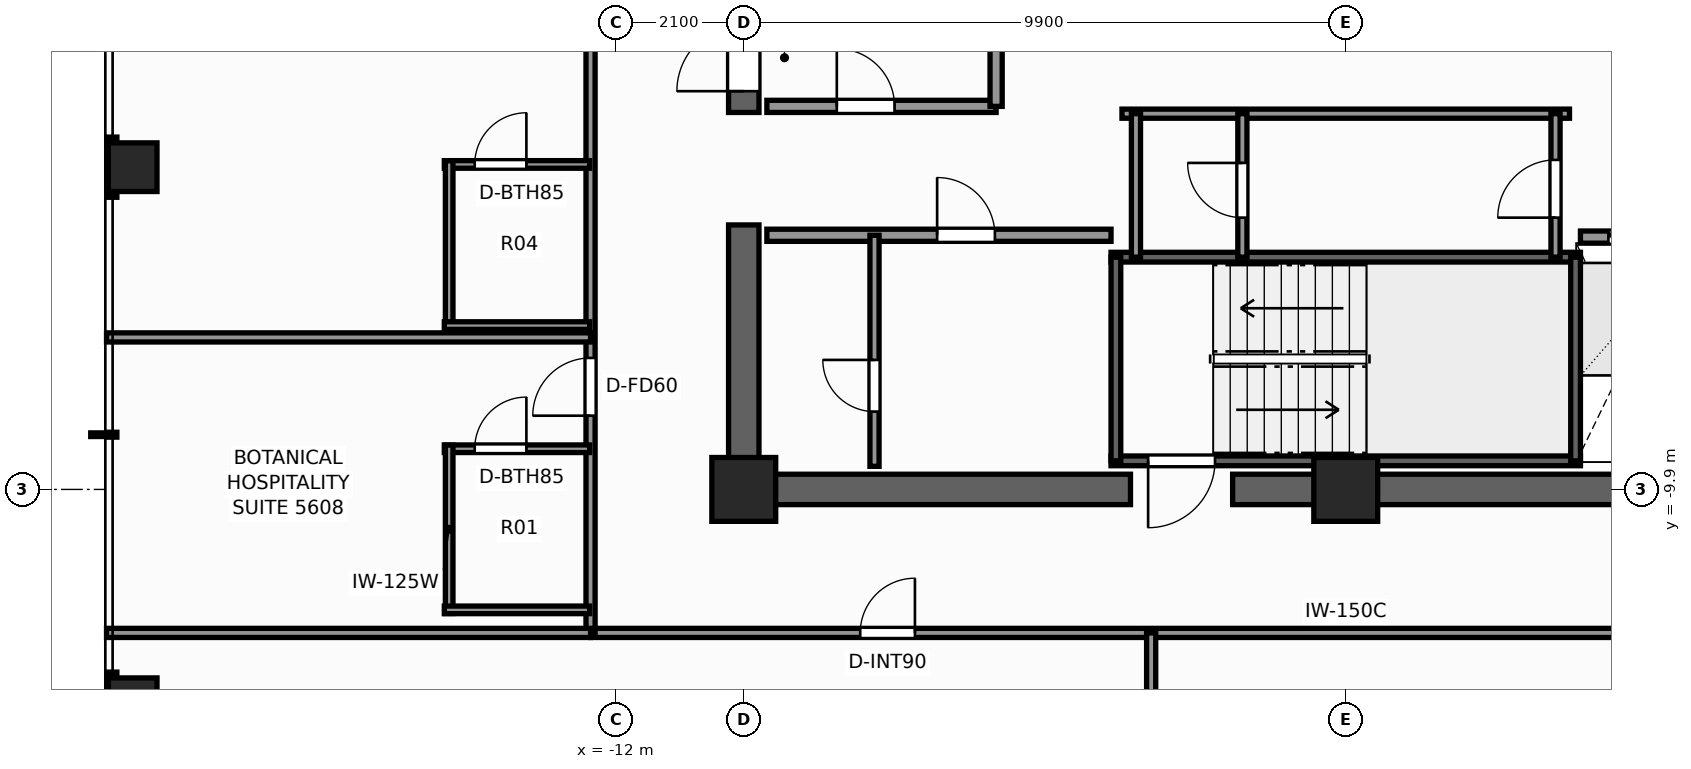
"""IFC4 building model, lengths in metres.
Left out: names, types, materials, properties, quantities, classifications, styles, units other than length and angle.
Written with IfcOpenShell. Run it as: python <this file> out.ifc"""

import sys

from ifc_helpers import new_model, si_unit, direction, frame, frame_2d, origin, origin_2d, place, context, subcontext, project, spatial, rectangle, extrude, element, fill, save


model = new_model("IFC4")
c1 = context("Model", 3, precision=1e-05, world=origin(), true_north=direction((0.0, 1.0)))
c2 = subcontext(c1, "Body", "Model", "MODEL_VIEW")
j1 = project(units=[si_unit("LENGTHUNIT", "METRE"), si_unit("PLANEANGLEUNIT", "RADIAN")], contexts=[c1])
p1 = place(None, origin())
s1 = spatial("IfcSite", under=j1, at=p1, CompositionType="ELEMENT")
p2 = place(p1, origin())
s2 = spatial("IfcBuilding", under=s1, at=p2, CompositionType="ELEMENT")
p3 = place(p2, frame((0.0, 0.0, 193.2)))
s3 = spatial("IfcBuildingStorey", under=s2, at=p3, CompositionType="ELEMENT", Elevation=193.2)
p4 = place(p3, frame((10.15, -9.9, 0.0), z_axis=(0.0, 0.0, 1.0), x_axis=(-1.0, 0.0, 0.0)))
e1 = element("IfcWall", 1, at=p4, inside=s3, PredefinedType="SHEAR", context=c2, shape_type="SweptSolid", body=[
    extrude(rectangle(XDim=12.01, YDim=0.5, at=frame_2d((6.005, 0.0))), origin(), (0.0, 0.0, 1.0), 3.3),
])
p5 = place(p3, frame((-3.54, -9.9, 0.0), z_axis=(0.0, 0.0, 1.0), x_axis=(-1.0, 0.0, 0.0)))
e2 = element("IfcWall", 2, at=p5, inside=s3, PredefinedType="SHEAR", context=c2, shape_type="SweptSolid", body=[
    extrude(rectangle(XDim=6.61, YDim=0.5, at=frame_2d((3.305, 0.0))), origin(), (0.0, 0.0, 1.0), 3.3),
])
p6 = place(p3, frame((-9.9, -9.65, 0.0), z_axis=(0.0, 0.0, 1.0), x_axis=(0.0, 1.0, 0.0)))
e3 = element("IfcWall", 3, at=p6, inside=s3, PredefinedType="SHEAR", context=c2, shape_type="SweptSolid", body=[
    extrude(rectangle(XDim=4.1, YDim=0.5, at=frame_2d((2.05, 0.0))), origin(), (0.0, 0.0, 1.0), 3.3),
])
p7 = place(p3, frame((-9.9, -3.7, 0.0), z_axis=(0.0, 0.0, 1.0), x_axis=(0.0, 1.0, 0.0)))
e4 = element("IfcWall", 4, at=p7, inside=s3, PredefinedType="SHEAR", context=c2, shape_type="SweptSolid", body=[
    extrude(rectangle(XDim=13.35, YDim=0.5, at=frame_2d((6.675, 0.0))), origin(), (0.0, 0.0, 1.0), 3.3),
])
p8 = place(p7, frame((0.35, 0.0, 0.0)))
e5 = element("IfcOpeningElement", 5, at=p8, cuts=e4, PredefinedType="OPENING", context=c2, shape_type="SweptSolid", body=[
    extrude(rectangle(XDim=1.1, YDim=2.2, at=frame_2d((0.55, 1.1))), frame((0.0, 0.26, 0.0), z_axis=(0.0, -1.0, 0.0), x_axis=(1.0, 0.0, 0.0)), (0.0, 0.0, 1.0), 0.52),
])
for number, where, z_axis, x_axis in (
    (6, (-9.9, -9.9, 0.0), (0.0, 0.0, 1.0), (1.0, 0.0, 0.0)),
    (7, (0.0, -9.9, 0.0), (0.0, 0.0, 1.0), (1.0, 0.0, 0.0)),
):
    element("IfcColumn", number, at=place(p3, frame(where, z_axis=z_axis, x_axis=x_axis)), inside=s3, PredefinedType="COLUMN", context=c2, shape_type="SweptSolid", body=[
        extrude(rectangle(XDim=1.05, YDim=1.05, at=origin_2d()), origin(), (0.0, 0.0, 1.0), 3.3),
    ])
for number, where, z_axis, x_axis in (
    (8, (-19.95, -13.4, 0.0), (0.0, 0.0, 1.0), (1.0, 0.0, 0.0)),
    (9, (-19.95, -4.6, 0.0), (0.0, 0.0, 1.0), (1.0, 0.0, 0.0)),
):
    element("IfcColumn", number, at=place(p3, frame(where, z_axis=z_axis, x_axis=x_axis)), inside=s3, PredefinedType="COLUMN", context=c2, shape_type="SweptSolid", body=[
        extrude(rectangle(XDim=0.8, YDim=0.8, at=origin_2d()), origin(), (0.0, 0.0, 1.0), 3.3),
    ])
p9 = place(p3, frame((3.86, -9.43, 0.0), z_axis=(0.0, 0.0, 1.0), x_axis=(-1.0, 0.0, 0.0)))
e10 = element("IfcWall", 10, at=p9, inside=s3, PredefinedType="SHEAR", context=c2, shape_type="SweptSolid", body=[
    extrude(rectangle(XDim=7.72, YDim=0.16, at=frame_2d((3.86, 0.0))), origin(), (0.0, 0.0, 1.0), 3.3),
])
p10 = place(p9, frame((6.01, 0.0, 0.0)))
e11 = element("IfcOpeningElement", 11, at=p10, cuts=e10, PredefinedType="OPENING", context=c2, shape_type="SweptSolid", body=[
    extrude(rectangle(XDim=1.1, YDim=2.2, at=frame_2d((0.55, 1.1))), frame((0.0, 0.09, 0.0), z_axis=(0.0, -1.0, 0.0), x_axis=(1.0, 0.0, 0.0)), (0.0, 0.0, 1.0), 0.18),
])
p11 = place(p3, frame((-3.86, -6.08, 0.0), z_axis=(0.0, 0.0, 1.0), x_axis=(1.0, 0.0, 0.0)))
e12 = element("IfcWall", 12, at=p11, inside=s3, PredefinedType="SHEAR", context=c2, shape_type="SweptSolid", body=[
    extrude(rectangle(XDim=7.72, YDim=0.16, at=frame_2d((3.86, 0.0))), origin(), (0.0, 0.0, 1.0), 3.3),
])
for number, where, z_axis, x_axis in (
    (13, (-3.78, -9.43, 0.0), (0.0, 0.0, 1.0), (0.0, 1.0, 0.0)),
    (14, (3.78, -9.43, 0.0), (0.0, 0.0, 1.0), (0.0, 1.0, 0.0)),
):
    element("IfcWall", number, at=place(p3, frame(where, z_axis=z_axis, x_axis=x_axis)), inside=s3, PredefinedType="SHEAR", context=c2, shape_type="SweptSolid", body=[
        extrude(rectangle(XDim=3.35, YDim=0.16, at=frame_2d((1.675, 0.0))), origin(), (0.0, 0.0, 1.0), 3.3),
    ])
p12 = place(p3, frame((-9.52, -3.6, 0.0), z_axis=(0.0, 0.0, 1.0), x_axis=(1.0, 0.0, 0.0)))
e15 = element("IfcWall", 15, at=p12, inside=s3, PredefinedType="SOLIDWALL", context=c2, shape_type="SweptSolid", body=[
    extrude(rectangle(XDim=3.77, YDim=0.2, at=frame_2d((1.885, 0.0))), origin(), (0.0, 0.0, 1.0), 3.08),
])
p13 = place(p12, frame((1.15, 0.0, 0.0)))
e16 = element("IfcOpeningElement", 16, at=p13, cuts=e15, PredefinedType="OPENING", context=c2, shape_type="SweptSolid", body=[
    extrude(rectangle(XDim=0.95, YDim=2.06, at=frame_2d((0.475, 1.03))), frame((0.0, 0.11, 0.0), z_axis=(0.0, -1.0, 0.0), x_axis=(1.0, 0.0, 0.0)), (0.0, 0.0, 1.0), 0.22),
])
p14 = place(p3, frame((-5.75, -3.6, 0.0), z_axis=(0.0, 0.0, 1.0), x_axis=(0.0, 1.0, 0.0)))
e17 = element("IfcWall", 17, at=p14, inside=s3, PredefinedType="SOLIDWALL", context=c2, shape_type="SweptSolid", body=[
    extrude(rectangle(XDim=5.57, YDim=0.2, at=frame_2d((2.785, 0.0))), origin(), (0.0, 0.0, 1.0), 3.08),
])
p15 = place(p14, frame((2.75, 0.0, 0.0)))
e18 = element("IfcOpeningElement", 18, at=p15, cuts=e17, PredefinedType="OPENING", context=c2, shape_type="SweptSolid", body=[
    extrude(rectangle(XDim=1.1, YDim=2.2, at=frame_2d((0.55, 1.1))), frame((0.0, 0.11, 0.0), z_axis=(0.0, -1.0, 0.0), x_axis=(1.0, 0.0, 0.0)), (0.0, 0.0, 1.0), 0.22),
])
p16 = place(p3, frame((-9.52, -5.72, 0.0), z_axis=(0.0, 0.0, 1.0), x_axis=(1.0, 0.0, 0.0)))
e19 = element("IfcWall", 19, at=p16, inside=s3, PredefinedType="SOLIDWALL", context=c2, shape_type="SweptSolid", body=[
    extrude(rectangle(XDim=5.66, YDim=0.2, at=frame_2d((2.83, 0.0))), origin(), (0.0, 0.0, 1.0), 3.08),
])
p17 = place(p16, frame((2.8, 0.0, 0.0)))
e20 = element("IfcOpeningElement", 20, at=p17, cuts=e19, PredefinedType="OPENING", context=c2, shape_type="SweptSolid", body=[
    extrude(rectangle(XDim=0.95, YDim=2.06, at=frame_2d((0.475, 1.03))), frame((0.0, 0.11, 0.0), z_axis=(0.0, -1.0, 0.0), x_axis=(1.0, 0.0, 0.0)), (0.0, 0.0, 1.0), 0.22),
])
p18 = place(p3, frame((-7.75, -9.52, 0.0), z_axis=(0.0, 0.0, 1.0), x_axis=(0.0, 1.0, 0.0)))
e21 = element("IfcWall", 21, at=p18, inside=s3, PredefinedType="PARTITIONING", context=c2, shape_type="SweptSolid", body=[
    extrude(rectangle(XDim=3.8, YDim=0.15, at=frame_2d((1.9, 0.0))), origin(), (0.0, 0.0, 1.0), 3.08),
])
p19 = place(p18, frame((0.9, 0.0, 0.0)))
e22 = element("IfcOpeningElement", 22, at=p19, cuts=e21, PredefinedType="OPENING", context=c2, shape_type="SweptSolid", body=[
    extrude(rectangle(XDim=0.85, YDim=2.03, at=frame_2d((0.425, 1.015))), frame((0.0, 0.085, 0.0), z_axis=(0.0, -1.0, 0.0), x_axis=(1.0, 0.0, 0.0)), (0.0, 0.0, 1.0), 0.17),
])
p20 = place(p3, frame((3.86, -5.75, 0.0), z_axis=(0.0, 0.0, 1.0), x_axis=(1.0, 0.0, 0.0)))
e23 = element("IfcWall", 23, at=p20, inside=s3, PredefinedType="SOLIDWALL", context=c2, shape_type="SweptSolid", body=[
    extrude(rectangle(XDim=5.66, YDim=0.2, at=frame_2d((2.83, 0.0))), origin(), (0.0, 0.0, 1.0), 3.08),
])
p21 = place(p20, frame((0.46, 0.0, 0.0)))
e24 = element("IfcOpeningElement", 24, at=p21, cuts=e23, PredefinedType="OPENING", context=c2, shape_type="SweptSolid", body=[
    extrude(rectangle(XDim=1.1, YDim=2.2, at=frame_2d((0.55, 1.1))), frame((0.0, 0.11, 0.0), z_axis=(0.0, -1.0, 0.0), x_axis=(1.0, 0.0, 0.0)), (0.0, 0.0, 1.0), 0.22),
])
p22 = place(p20, frame((2.39, 0.0, 0.0)))
e25 = element("IfcOpeningElement", 25, at=p22, cuts=e23, PredefinedType="OPENING", context=c2, shape_type="SweptSolid", body=[
    extrude(rectangle(XDim=1.1, YDim=2.2, at=frame_2d((0.55, 1.1))), frame((0.0, 0.11, 0.0), z_axis=(0.0, -1.0, 0.0), x_axis=(1.0, 0.0, 0.0)), (0.0, 0.0, 1.0), 0.22),
])
p23 = place(p20, frame((4.32, 0.0, 0.0)))
e26 = element("IfcOpeningElement", 26, at=p23, cuts=e23, PredefinedType="OPENING", context=c2, shape_type="SweptSolid", body=[
    extrude(rectangle(XDim=1.1, YDim=2.2, at=frame_2d((0.55, 1.1))), frame((0.0, 0.11, 0.0), z_axis=(0.0, -1.0, 0.0), x_axis=(1.0, 0.0, 0.0)), (0.0, 0.0, 1.0), 0.22),
])
p24 = place(p3, frame((-3.68, -3.72, 0.0), z_axis=(0.0, 0.0, 1.0), x_axis=(1.0, 0.0, 0.0)))
e27 = element("IfcWall", 27, at=p24, inside=s3, PredefinedType="PARTITIONING", context=c2, shape_type="SweptSolid", body=[
    extrude(rectangle(XDim=7.36, YDim=0.15, at=frame_2d((3.68, 0.0))), origin(), (0.0, 0.0, 1.0), 3.08),
])
p25 = place(p3, frame((3.45, -6.08, 0.0), z_axis=(0.0, 0.0, 1.0), x_axis=(0.0, 1.0, 0.0)))
e28 = element("IfcWall", 28, at=p25, inside=s3, PredefinedType="PARTITIONING", context=c2, shape_type="SweptSolid", body=[
    extrude(rectangle(XDim=2.36, YDim=0.15, at=frame_2d((1.18, 0.0))), origin(), (0.0, 0.0, 1.0), 3.08),
])
p26 = place(p25, frame((0.65, 0.0, 0.0)))
e29 = element("IfcOpeningElement", 29, at=p26, cuts=e28, PredefinedType="OPENING", context=c2, shape_type="SweptSolid", body=[
    extrude(rectangle(XDim=0.95, YDim=2.06, at=frame_2d((0.475, 1.03))), frame((0.0, 0.085, 0.0), z_axis=(0.0, -1.0, 0.0), x_axis=(1.0, 0.0, 0.0)), (0.0, 0.0, 1.0), 0.17),
])
p27 = place(p3, frame((-3.45, -6.08, 0.0), z_axis=(0.0, 0.0, 1.0), x_axis=(0.0, 1.0, 0.0)))
e30 = element("IfcWall", 30, at=p27, inside=s3, PredefinedType="PARTITIONING", context=c2, shape_type="SweptSolid", body=[
    extrude(rectangle(XDim=2.36, YDim=0.15, at=frame_2d((1.18, 0.0))), origin(), (0.0, 0.0, 1.0), 3.08),
])
p28 = place(p3, frame((-1.7, -6.08, 0.0), z_axis=(0.0, 0.0, 1.0), x_axis=(0.0, 1.0, 0.0)))
e31 = element("IfcWall", 31, at=p28, inside=s3, PredefinedType="PARTITIONING", context=c2, shape_type="SweptSolid", body=[
    extrude(rectangle(XDim=2.36, YDim=0.15, at=frame_2d((1.18, 0.0))), origin(), (0.0, 0.0, 1.0), 3.08),
])
p29 = place(p28, frame((0.65, 0.0, 0.0)))
e32 = element("IfcOpeningElement", 32, at=p29, cuts=e31, PredefinedType="OPENING", context=c2, shape_type="SweptSolid", body=[
    extrude(rectangle(XDim=0.9, YDim=2.06, at=frame_2d((0.45, 1.03))), frame((0.0, 0.085, 0.0), z_axis=(0.0, -1.0, 0.0), x_axis=(1.0, 0.0, 0.0)), (0.0, 0.0, 1.0), 0.17),
])
p30 = place(p3, frame((-12.42, -12.26, 0.0), z_axis=(0.0, 0.0, 1.0), x_axis=(1.0, 0.0, 0.0)))
e33 = element("IfcWall", 33, at=p30, inside=s3, PredefinedType="PARTITIONING", context=c2, shape_type="SweptSolid", body=[
    extrude(rectangle(XDim=24.84, YDim=0.15, at=frame_2d((12.42, 0.0))), origin(), (0.0, 0.0, 1.0), 2.369),
])
p31 = place(p30, frame((4.435, 0.0, 0.0)))
e34 = element("IfcOpeningElement", 34, at=p31, cuts=e33, PredefinedType="OPENING", context=c2, shape_type="SweptSolid", body=[
    extrude(rectangle(XDim=0.9, YDim=2.06, at=frame_2d((0.45, 1.03))), frame((0.0, 0.085, 0.0), z_axis=(0.0, -1.0, 0.0), x_axis=(1.0, 0.0, 0.0)), (0.0, 0.0, 1.0), 0.17),
])
p32 = place(p30, frame((19.505, 0.0, 0.0)))
e35 = element("IfcOpeningElement", 35, at=p32, cuts=e33, PredefinedType="OPENING", context=c2, shape_type="SweptSolid", body=[
    extrude(rectangle(XDim=0.9, YDim=2.06, at=frame_2d((0.45, 1.03))), frame((0.0, 0.085, 0.0), z_axis=(0.0, -1.0, 0.0), x_axis=(1.0, 0.0, 0.0)), (0.0, 0.0, 1.0), 0.17),
])
p33 = place(p3, frame((-12.42, -12.26, 0.0), z_axis=(0.0, 0.0, 1.0), x_axis=(0.0, 1.0, 0.0)))
e36 = element("IfcWall", 36, at=p33, inside=s3, PredefinedType="PARTITIONING", context=c2, shape_type="SweptSolid", body=[
    extrude(rectangle(XDim=24.84, YDim=0.15, at=frame_2d((12.42, 0.0))), origin(), (0.0, 0.0, 1.0), 2.369),
])
p34 = place(p33, frame((3.573, 0.0, 0.0)))
e37 = element("IfcOpeningElement", 37, at=p34, cuts=e36, PredefinedType="OPENING", context=c2, shape_type="SweptSolid", body=[
    extrude(rectangle(XDim=0.95, YDim=2.06, at=frame_2d((0.475, 1.03))), frame((0.0, 0.085, 0.0), z_axis=(0.0, -1.0, 0.0), x_axis=(1.0, 0.0, 0.0)), (0.0, 0.0, 1.0), 0.17),
])
p35 = place(p33, frame((9.755, 0.0, 0.0)))
e38 = element("IfcOpeningElement", 38, at=p35, cuts=e36, PredefinedType="OPENING", context=c2, shape_type="SweptSolid", body=[
    extrude(rectangle(XDim=0.95, YDim=2.06, at=frame_2d((0.475, 1.03))), frame((0.0, 0.085, 0.0), z_axis=(0.0, -1.0, 0.0), x_axis=(1.0, 0.0, 0.0)), (0.0, 0.0, 1.0), 0.17),
])
p36 = place(p33, frame((19.32, 0.0, 0.0)))
e39 = element("IfcOpeningElement", 39, at=p36, cuts=e36, PredefinedType="OPENING", context=c2, shape_type="SweptSolid", body=[
    extrude(rectangle(XDim=0.95, YDim=2.06, at=frame_2d((0.475, 1.03))), frame((0.0, 0.085, 0.0), z_axis=(0.0, -1.0, 0.0), x_axis=(1.0, 0.0, 0.0)), (0.0, 0.0, 1.0), 0.17),
])
p37 = place(p3, frame((-20.38, -12.26, 0.0), z_axis=(0.0, 0.0, 1.0), x_axis=(1.0, 0.0, 0.0)))
e40 = element("IfcWall", 40, at=p37, inside=s3, PredefinedType="PARTITIONING", context=c2, shape_type="SweptSolid", body=[
    extrude(rectangle(XDim=7.96, YDim=0.15, at=frame_2d((3.98, 0.0))), origin(), (0.0, 0.0, 1.0), 2.369),
])
p38 = place(p3, frame((-3.2, -20.38, 0.0), z_axis=(0.0, 0.0, 1.0), x_axis=(0.0, 1.0, 0.0)))
e41 = element("IfcWall", 41, at=p38, inside=s3, PredefinedType="PARTITIONING", context=c2, shape_type="SweptSolid", body=[
    extrude(rectangle(XDim=8.12, YDim=0.15, at=frame_2d((4.06, 0.0))), origin(), (0.0, 0.0, 1.0), 2.369),
])
p39 = place(p3, frame((-20.38, -7.4, 0.0), z_axis=(0.0, 0.0, 1.0), x_axis=(1.0, 0.0, 0.0)))
e42 = element("IfcWall", 42, at=p39, inside=s3, PredefinedType="PARTITIONING", context=c2, shape_type="SweptSolid", body=[
    extrude(rectangle(XDim=7.96, YDim=0.15, at=frame_2d((3.98, 0.0))), origin(), (0.0, 0.0, 1.0), 2.453),
])
p40 = place(p3, frame((-14.825, -9.231, 0.0), z_axis=(0.0, 0.0, 1.0), x_axis=(1.0, 0.0, 0.0)))
e43 = element("IfcWall", 43, at=p40, inside=s3, PredefinedType="PARTITIONING", context=c2, shape_type="SweptSolid", body=[
    extrude(rectangle(XDim=2.39, YDim=0.125, at=frame_2d((1.195, 0.0))), origin(), (0.0, 0.0, 1.0), 3.08),
])
p41 = place(p40, frame((0.5, 0.0, 0.0)))
e44 = element("IfcOpeningElement", 44, at=p41, cuts=e43, PredefinedType="OPENING", context=c2, shape_type="SweptSolid", body=[
    extrude(rectangle(XDim=0.85, YDim=2.03, at=frame_2d((0.425, 1.015))), frame((0.0, 0.073, 0.0), z_axis=(0.0, -1.0, 0.0), x_axis=(1.0, 0.0, 0.0)), (0.0, 0.0, 1.0), 0.145),
])
p42 = place(p3, frame((-14.745, -11.941, 0.0), z_axis=(0.0, 0.0, 1.0), x_axis=(0.0, 1.0, 0.0)))
e45 = element("IfcWall", 45, at=p42, inside=s3, PredefinedType="PARTITIONING", context=c2, shape_type="SweptSolid", body=[
    extrude(rectangle(XDim=2.77, YDim=0.125, at=frame_2d((1.385, 0.0))), origin(), (0.0, 0.0, 1.0), 2.369),
])
p43 = place(p3, frame((-14.825, -11.881, 0.0), z_axis=(0.0, 0.0, 1.0), x_axis=(1.0, 0.0, 0.0)))
e46 = element("IfcWall", 46, at=p43, inside=s3, PredefinedType="PARTITIONING", context=c2, shape_type="SweptSolid", body=[
    extrude(rectangle(XDim=2.39, YDim=0.125, at=frame_2d((1.195, 0.0))), origin(), (0.0, 0.0, 1.0), 3.08),
])
p44 = place(p3, frame((-14.825, -4.555, 0.0), z_axis=(0.0, 0.0, 1.0), x_axis=(1.0, 0.0, 0.0)))
e47 = element("IfcWall", 47, at=p44, inside=s3, PredefinedType="PARTITIONING", context=c2, shape_type="SweptSolid", body=[
    extrude(rectangle(XDim=2.39, YDim=0.125, at=frame_2d((1.195, 0.0))), origin(), (0.0, 0.0, 1.0), 2.369),
])
p45 = place(p44, frame((0.5, 0.0, 0.0)))
e48 = element("IfcOpeningElement", 48, at=p45, cuts=e47, PredefinedType="OPENING", context=c2, shape_type="SweptSolid", body=[
    extrude(rectangle(XDim=0.85, YDim=2.03, at=frame_2d((0.425, 1.015))), frame((0.0, 0.073, 0.0), z_axis=(0.0, -1.0, 0.0), x_axis=(1.0, 0.0, 0.0)), (0.0, 0.0, 1.0), 0.145),
])
p46 = place(p3, frame((-14.745, -7.265, 0.0), z_axis=(0.0, 0.0, 1.0), x_axis=(0.0, 1.0, 0.0)))
e49 = element("IfcWall", 49, at=p46, inside=s3, PredefinedType="PARTITIONING", context=c2, shape_type="SweptSolid", body=[
    extrude(rectangle(XDim=2.77, YDim=0.125, at=frame_2d((1.385, 0.0))), origin(), (0.0, 0.0, 1.0), 2.369),
])
p47 = place(p3, frame((-14.825, -7.205, 0.0), z_axis=(0.0, 0.0, 1.0), x_axis=(1.0, 0.0, 0.0)))
e50 = element("IfcWall", 50, at=p47, inside=s3, PredefinedType="PARTITIONING", context=c2, shape_type="SweptSolid", body=[
    extrude(rectangle(XDim=2.39, YDim=0.125, at=frame_2d((1.195, 0.0))), origin(), (0.0, 0.0, 1.0), 3.08),
])
p48 = place(p10, origin())
e51 = element("IfcDoor", 51, at=p48, inside=s3, OperationType="SINGLE_SWING_RIGHT", PredefinedType="DOOR", context=c2, shape_type="SweptSolid", body=[
    extrude(rectangle(XDim=1.1, YDim=2.2, at=frame_2d((0.55, 1.1))), frame((0.0, 0.025, 0.0), z_axis=(0.0, -1.0, 0.0), x_axis=(1.0, 0.0, 0.0)), (0.0, 0.0, 1.0), 0.05),
])
fill(e11, e51)
p49 = place(p8, origin())
e52 = element("IfcDoor", 52, at=p49, inside=s3, OperationType="SINGLE_SWING_LEFT", PredefinedType="DOOR", context=c2, shape_type="SweptSolid", body=[
    extrude(rectangle(XDim=1.1, YDim=2.2, at=frame_2d((0.55, 1.1))), frame((0.0, 0.025, 0.0), z_axis=(0.0, -1.0, 0.0), x_axis=(1.0, 0.0, 0.0)), (0.0, 0.0, 1.0), 0.05),
])
fill(e5, e52)
p50 = place(p17, origin())
e53 = element("IfcDoor", 53, at=p50, inside=s3, OperationType="SINGLE_SWING_LEFT", PredefinedType="DOOR", context=c2, shape_type="SweptSolid", body=[
    extrude(rectangle(XDim=0.95, YDim=2.06, at=frame_2d((0.475, 1.03))), frame((0.0, 0.025, 0.0), z_axis=(0.0, -1.0, 0.0), x_axis=(1.0, 0.0, 0.0)), (0.0, 0.0, 1.0), 0.05),
])
fill(e20, e53)
p51 = place(p19, origin())
e54 = element("IfcDoor", 54, at=p51, inside=s3, OperationType="SINGLE_SWING_RIGHT", PredefinedType="DOOR", context=c2, shape_type="SweptSolid", body=[
    extrude(rectangle(XDim=0.85, YDim=2.03, at=frame_2d((0.425, 1.015))), frame((0.0, 0.025, 0.0), z_axis=(0.0, -1.0, 0.0), x_axis=(1.0, 0.0, 0.0)), (0.0, 0.0, 1.0), 0.05),
])
fill(e22, e54)
p52 = place(p13, origin())
e55 = element("IfcDoor", 55, at=p52, inside=s3, OperationType="SINGLE_SWING_LEFT", PredefinedType="DOOR", context=c2, shape_type="SweptSolid", body=[
    extrude(rectangle(XDim=0.95, YDim=2.06, at=frame_2d((0.475, 1.03))), frame((0.0, 0.025, 0.0), z_axis=(0.0, -1.0, 0.0), x_axis=(1.0, 0.0, 0.0)), (0.0, 0.0, 1.0), 0.05),
])
fill(e16, e55)
p53 = place(p21, origin())
e56 = element("IfcDoor", 56, at=p53, inside=s3, OperationType="DOUBLE_DOOR_SLIDING", PredefinedType="DOOR", context=c2, shape_type="SweptSolid", body=[
    extrude(rectangle(XDim=1.1, YDim=2.2, at=frame_2d((0.55, 1.1))), frame((0.0, 0.025, 0.0), z_axis=(0.0, -1.0, 0.0), x_axis=(1.0, 0.0, 0.0)), (0.0, 0.0, 1.0), 0.05),
])
fill(e24, e56)
p54 = place(p26, origin())
e57 = element("IfcDoor", 57, at=p54, inside=s3, OperationType="SINGLE_SWING_LEFT", PredefinedType="DOOR", context=c2, shape_type="SweptSolid", body=[
    extrude(rectangle(XDim=0.95, YDim=2.06, at=frame_2d((0.475, 1.03))), frame((0.0, 0.025, 0.0), z_axis=(0.0, -1.0, 0.0), x_axis=(1.0, 0.0, 0.0)), (0.0, 0.0, 1.0), 0.05),
])
fill(e29, e57)
p55 = place(p29, origin())
e58 = element("IfcDoor", 58, at=p55, inside=s3, OperationType="SINGLE_SWING_RIGHT", PredefinedType="DOOR", context=c2, shape_type="SweptSolid", body=[
    extrude(rectangle(XDim=0.9, YDim=2.06, at=frame_2d((0.45, 1.03))), frame((0.0, 0.025, 0.0), z_axis=(0.0, -1.0, 0.0), x_axis=(1.0, 0.0, 0.0)), (0.0, 0.0, 1.0), 0.05),
])
fill(e32, e58)
p56 = place(p31, origin())
e59 = element("IfcDoor", 59, at=p56, inside=s3, OperationType="SINGLE_SWING_RIGHT", PredefinedType="DOOR", context=c2, shape_type="SweptSolid", body=[
    extrude(rectangle(XDim=0.9, YDim=2.06, at=frame_2d((0.45, 1.03))), frame((0.0, 0.025, 0.0), z_axis=(0.0, -1.0, 0.0), x_axis=(1.0, 0.0, 0.0)), (0.0, 0.0, 1.0), 0.05),
])
fill(e34, e59)
p57 = place(p41, origin())
e60 = element("IfcDoor", 60, at=p57, inside=s3, OperationType="SINGLE_SWING_RIGHT", PredefinedType="DOOR", context=c2, shape_type="SweptSolid", body=[
    extrude(rectangle(XDim=0.85, YDim=2.03, at=frame_2d((0.425, 1.015))), frame((0.0, 0.025, 0.0), z_axis=(0.0, -1.0, 0.0), x_axis=(1.0, 0.0, 0.0)), (0.0, 0.0, 1.0), 0.05),
])
fill(e44, e60)
p58 = place(p34, origin())
e61 = element("IfcDoor", 61, at=p58, inside=s3, OperationType="SINGLE_SWING_LEFT", PredefinedType="DOOR", context=c2, shape_type="SweptSolid", body=[
    extrude(rectangle(XDim=0.95, YDim=2.06, at=frame_2d((0.475, 1.03))), frame((0.0, 0.025, 0.0), z_axis=(0.0, -1.0, 0.0), x_axis=(1.0, 0.0, 0.0)), (0.0, 0.0, 1.0), 0.05),
])
fill(e37, e61)
p59 = place(p45, origin())
e62 = element("IfcDoor", 62, at=p59, inside=s3, OperationType="SINGLE_SWING_RIGHT", PredefinedType="DOOR", context=c2, shape_type="SweptSolid", body=[
    extrude(rectangle(XDim=0.85, YDim=2.03, at=frame_2d((0.425, 1.015))), frame((0.0, 0.025, 0.0), z_axis=(0.0, -1.0, 0.0), x_axis=(1.0, 0.0, 0.0)), (0.0, 0.0, 1.0), 0.05),
])
fill(e48, e62)
save(model, sys.argv[1])
